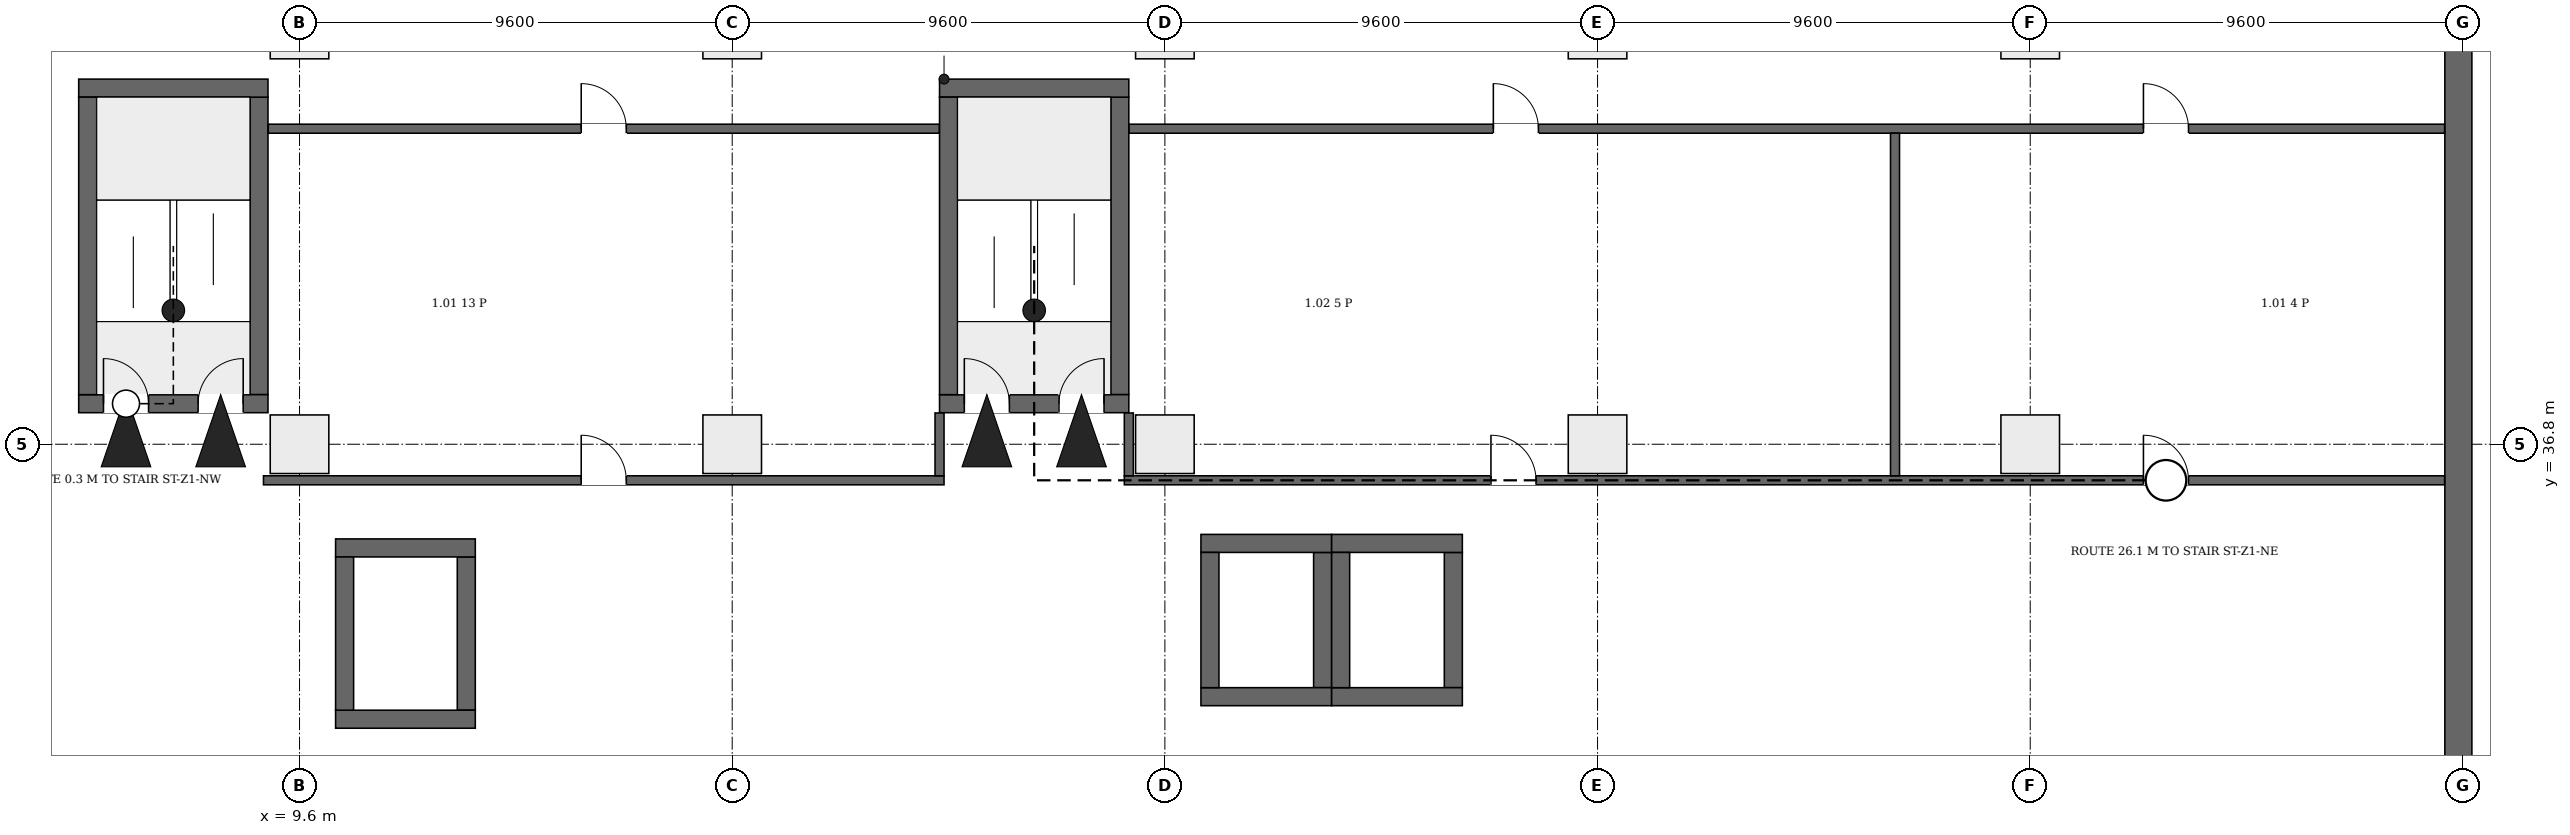
"""IFC4 building model, lengths in metres.
Left out: names, types, materials, properties, quantities, classifications, styles, units other than length and angle.
Written with IfcOpenShell. Run it as: python <this file> out.ifc"""

import sys

from ifc_helpers import new_model, si_unit, direction, frame, frame_2d, origin, origin_2d, place, context, subcontext, project, spatial, rectangle, extrude, element, fill, save


model = new_model("IFC4")
c1 = context("Model", 3, precision=1e-05, world=origin(), true_north=direction((0.0, 1.0)))
c2 = subcontext(c1, "Body", "Model", "MODEL_VIEW")
j1 = project(units=[si_unit("LENGTHUNIT", "METRE"), si_unit("PLANEANGLEUNIT", "RADIAN")], contexts=[c1])
p1 = place(None, origin())
s1 = spatial("IfcSite", under=j1, at=p1, CompositionType="ELEMENT")
p2 = place(p1, origin())
s2 = spatial("IfcBuilding", under=s1, at=p2, CompositionType="ELEMENT")
p3 = place(p2, frame((0.0, 0.0, -5.5)))
s3 = spatial("IfcBuildingStorey", under=s2, at=p3, CompositionType="ELEMENT", Elevation=-5.5)
p4 = place(p3, frame((57.5, -0.2, 0.0), z_axis=(0.0, 0.0, 1.0), x_axis=(0.0, 1.0, 0.0)))
e1 = element("IfcWall", 1, at=p4, inside=s3, PredefinedType="SOLIDWALL", context=c2, shape_type="SweptSolid", body=[
    extrude(rectangle(XDim=46.88, YDim=0.6, at=frame_2d((23.44, 0.0))), origin(), (0.0, 0.0, 1.0), 5.5),
])
p5 = place(p3, frame((4.7, 37.7, 0.0), z_axis=(0.0, 0.0, 1.0), x_axis=(1.0, 0.0, 0.0)))
e2 = element("IfcWall", 2, at=p5, inside=s3, PredefinedType="SHEAR", context=c2, shape_type="SweptSolid", body=[
    extrude(rectangle(XDim=4.2, YDim=0.4, at=frame_2d((2.1, 0.0))), origin(), (0.0, 0.0, 1.0), 5.5),
])
p6 = place(p5, frame((0.55, 0.0, 0.0)))
e3 = element("IfcOpeningElement", 3, at=p6, cuts=e2, PredefinedType="OPENING", context=c2, shape_type="SweptSolid", body=[
    extrude(rectangle(XDim=1.0, YDim=2.1, at=frame_2d((0.5, 1.05))), frame((0.0, 0.21, 0.0), z_axis=(0.0, -1.0, 0.0), x_axis=(1.0, 0.0, 0.0)), (0.0, 0.0, 1.0), 0.42),
])
p7 = place(p5, frame((2.65, 0.0, 0.0)))
e4 = element("IfcOpeningElement", 4, at=p7, cuts=e2, PredefinedType="OPENING", context=c2, shape_type="SweptSolid", body=[
    extrude(rectangle(XDim=1.0, YDim=2.1, at=frame_2d((0.5, 1.05))), frame((0.0, 0.21, 0.0), z_axis=(0.0, -1.0, 0.0), x_axis=(1.0, 0.0, 0.0)), (0.0, 0.0, 1.0), 0.42),
])
p8 = place(p3, frame((4.7, 44.7, 0.0), z_axis=(0.0, 0.0, 1.0), x_axis=(1.0, 0.0, 0.0)))
e5 = element("IfcWall", 5, at=p8, inside=s3, PredefinedType="SHEAR", context=c2, shape_type="SweptSolid", body=[
    extrude(rectangle(XDim=4.2, YDim=0.4, at=frame_2d((2.1, 0.0))), origin(), (0.0, 0.0, 1.0), 5.5),
])
for number, where, z_axis, x_axis in (
    (6, (4.9, 37.9, 0.0), (0.0, 0.0, 1.0), (0.0, 1.0, 0.0)),
    (7, (8.7, 37.9, 0.0), (0.0, 0.0, 1.0), (0.0, 1.0, 0.0)),
):
    element("IfcWall", number, at=place(p3, frame(where, z_axis=z_axis, x_axis=x_axis)), inside=s3, PredefinedType="SHEAR", context=c2, shape_type="SweptSolid", body=[
        extrude(rectangle(XDim=6.6, YDim=0.4, at=frame_2d((3.3, 0.0))), origin(), (0.0, 0.0, 1.0), 5.5),
    ])
p9 = place(p3, frame((23.8, 37.7, 0.0), z_axis=(0.0, 0.0, 1.0), x_axis=(1.0, 0.0, 0.0)))
e8 = element("IfcWall", 8, at=p9, inside=s3, PredefinedType="SHEAR", context=c2, shape_type="SweptSolid", body=[
    extrude(rectangle(XDim=4.2, YDim=0.4, at=frame_2d((2.1, 0.0))), origin(), (0.0, 0.0, 1.0), 5.5),
])
p10 = place(p9, frame((0.55, 0.0, 0.0)))
e9 = element("IfcOpeningElement", 9, at=p10, cuts=e8, PredefinedType="OPENING", context=c2, shape_type="SweptSolid", body=[
    extrude(rectangle(XDim=1.0, YDim=2.1, at=frame_2d((0.5, 1.05))), frame((0.0, 0.21, 0.0), z_axis=(0.0, -1.0, 0.0), x_axis=(1.0, 0.0, 0.0)), (0.0, 0.0, 1.0), 0.42),
])
p11 = place(p9, frame((2.65, 0.0, 0.0)))
e10 = element("IfcOpeningElement", 10, at=p11, cuts=e8, PredefinedType="OPENING", context=c2, shape_type="SweptSolid", body=[
    extrude(rectangle(XDim=1.0, YDim=2.1, at=frame_2d((0.5, 1.05))), frame((0.0, 0.21, 0.0), z_axis=(0.0, -1.0, 0.0), x_axis=(1.0, 0.0, 0.0)), (0.0, 0.0, 1.0), 0.42),
])
p12 = place(p3, frame((23.8, 44.7, 0.0), z_axis=(0.0, 0.0, 1.0), x_axis=(1.0, 0.0, 0.0)))
e11 = element("IfcWall", 11, at=p12, inside=s3, PredefinedType="SHEAR", context=c2, shape_type="SweptSolid", body=[
    extrude(rectangle(XDim=4.2, YDim=0.4, at=frame_2d((2.1, 0.0))), origin(), (0.0, 0.0, 1.0), 5.5),
])
for number, where, z_axis, x_axis in (
    (12, (24.0, 37.9, 0.0), (0.0, 0.0, 1.0), (0.0, 1.0, 0.0)),
    (13, (27.8, 37.9, 0.0), (0.0, 0.0, 1.0), (0.0, 1.0, 0.0)),
):
    element("IfcWall", number, at=place(p3, frame(where, z_axis=z_axis, x_axis=x_axis)), inside=s3, PredefinedType="SHEAR", context=c2, shape_type="SweptSolid", body=[
        extrude(rectangle(XDim=6.6, YDim=0.4, at=frame_2d((3.3, 0.0))), origin(), (0.0, 0.0, 1.0), 5.5),
    ])
for number, where, z_axis, x_axis in (
    (14, (10.4, 30.7, 0.0), (0.0, 0.0, 1.0), (1.0, 0.0, 0.0)),
    (15, (10.4, 34.5, 0.0), (0.0, 0.0, 1.0), (1.0, 0.0, 0.0)),
):
    element("IfcWall", number, at=place(p3, frame(where, z_axis=z_axis, x_axis=x_axis)), inside=s3, PredefinedType="SHEAR", context=c2, shape_type="SweptSolid", body=[
        extrude(rectangle(XDim=3.1, YDim=0.4, at=frame_2d((1.55, 0.0))), origin(), (0.0, 0.0, 1.0), 5.5),
    ])
for number, where, z_axis, x_axis in (
    (16, (10.6, 30.9, 0.0), (0.0, 0.0, 1.0), (0.0, 1.0, 0.0)),
    (17, (13.3, 30.9, 0.0), (0.0, 0.0, 1.0), (0.0, 1.0, 0.0)),
):
    element("IfcWall", number, at=place(p3, frame(where, z_axis=z_axis, x_axis=x_axis)), inside=s3, PredefinedType="SHEAR", context=c2, shape_type="SweptSolid", body=[
        extrude(rectangle(XDim=3.4, YDim=0.4, at=frame_2d((1.7, 0.0))), origin(), (0.0, 0.0, 1.0), 5.5),
    ])
for number, where, z_axis, x_axis in (
    (18, (29.6, 31.2, 0.0), (0.0, 0.0, 1.0), (1.0, 0.0, 0.0)),
    (19, (29.6, 34.6, 0.0), (0.0, 0.0, 1.0), (1.0, 0.0, 0.0)),
):
    element("IfcWall", number, at=place(p3, frame(where, z_axis=z_axis, x_axis=x_axis)), inside=s3, PredefinedType="SHEAR", context=c2, shape_type="SweptSolid", body=[
        extrude(rectangle(XDim=2.9, YDim=0.4, at=frame_2d((1.45, 0.0))), origin(), (0.0, 0.0, 1.0), 5.5),
    ])
for number, where, z_axis, x_axis in (
    (20, (29.8, 31.4, 0.0), (0.0, 0.0, 1.0), (0.0, 1.0, 0.0)),
    (21, (32.3, 31.4, 0.0), (0.0, 0.0, 1.0), (0.0, 1.0, 0.0)),
):
    element("IfcWall", number, at=place(p3, frame(where, z_axis=z_axis, x_axis=x_axis)), inside=s3, PredefinedType="SHEAR", context=c2, shape_type="SweptSolid", body=[
        extrude(rectangle(XDim=3.0, YDim=0.4, at=frame_2d((1.5, 0.0))), origin(), (0.0, 0.0, 1.0), 5.5),
    ])
for number, where, z_axis, x_axis in (
    (22, (32.5, 31.2, 0.0), (0.0, 0.0, 1.0), (1.0, 0.0, 0.0)),
    (23, (32.5, 34.6, 0.0), (0.0, 0.0, 1.0), (1.0, 0.0, 0.0)),
):
    element("IfcWall", number, at=place(p3, frame(where, z_axis=z_axis, x_axis=x_axis)), inside=s3, PredefinedType="SHEAR", context=c2, shape_type="SweptSolid", body=[
        extrude(rectangle(XDim=2.9, YDim=0.4, at=frame_2d((1.45, 0.0))), origin(), (0.0, 0.0, 1.0), 5.5),
    ])
for number, where, z_axis, x_axis in (
    (24, (32.7, 31.4, 0.0), (0.0, 0.0, 1.0), (0.0, 1.0, 0.0)),
    (25, (35.2, 31.4, 0.0), (0.0, 0.0, 1.0), (0.0, 1.0, 0.0)),
):
    element("IfcWall", number, at=place(p3, frame(where, z_axis=z_axis, x_axis=x_axis)), inside=s3, PredefinedType="SHEAR", context=c2, shape_type="SweptSolid", body=[
        extrude(rectangle(XDim=3.0, YDim=0.4, at=frame_2d((1.5, 0.0))), origin(), (0.0, 0.0, 1.0), 5.5),
    ])
for number, where, z_axis, x_axis in (
    (26, (9.6, 36.8, 0.0), (0.0, 0.0, 1.0), (1.0, 0.0, 0.0)),
    (27, (19.2, 36.8, 0.0), (0.0, 0.0, 1.0), (1.0, 0.0, 0.0)),
    (28, (28.8, 36.8, 0.0), (0.0, 0.0, 1.0), (1.0, 0.0, 0.0)),
    (29, (38.4, 36.8, 0.0), (0.0, 0.0, 1.0), (1.0, 0.0, 0.0)),
    (30, (48.0, 36.8, 0.0), (0.0, 0.0, 1.0), (1.0, 0.0, 0.0)),
    (31, (9.6, 46.0, 0.0), (0.0, 0.0, 1.0), (1.0, 0.0, 0.0)),
    (32, (19.2, 46.0, 0.0), (0.0, 0.0, 1.0), (1.0, 0.0, 0.0)),
    (33, (28.8, 46.0, 0.0), (0.0, 0.0, 1.0), (1.0, 0.0, 0.0)),
    (34, (38.4, 46.0, 0.0), (0.0, 0.0, 1.0), (1.0, 0.0, 0.0)),
    (35, (48.0, 46.0, 0.0), (0.0, 0.0, 1.0), (1.0, 0.0, 0.0)),
):
    element("IfcColumn", number, at=place(p3, frame(where, z_axis=z_axis, x_axis=x_axis)), inside=s3, PredefinedType="COLUMN", context=c2, shape_type="SweptSolid", body=[
        extrude(rectangle(XDim=1.3, YDim=1.3, at=origin_2d()), origin(), (0.0, 0.0, 1.0), 5.5),
    ])
p13 = place(p3, frame((8.8, 36.0, 0.0), z_axis=(0.0, 0.0, 1.0), x_axis=(1.0, 0.0, 0.0)))
e36 = element("IfcWall", 36, at=p13, inside=s3, PredefinedType="PARTITIONING", context=c2, shape_type="SweptSolid", body=[
    extrude(rectangle(XDim=15.1, YDim=0.2, at=frame_2d((7.55, 0.0))), origin(), (0.0, 0.0, 1.0), 5.15),
])
p14 = place(p13, frame((7.05, 0.0, 0.0)))
e37 = element("IfcOpeningElement", 37, at=p14, cuts=e36, PredefinedType="OPENING", context=c2, shape_type="SweptSolid", body=[
    extrude(rectangle(XDim=1.0, YDim=2.1, at=frame_2d((0.5, 1.05))), frame((0.0, 0.11, 0.0), z_axis=(0.0, -1.0, 0.0), x_axis=(1.0, 0.0, 0.0)), (0.0, 0.0, 1.0), 0.22),
])
p15 = place(p3, frame((8.906, 43.8, 0.0), z_axis=(0.0, 0.0, 1.0), x_axis=(1.0, 0.0, 0.0)))
e38 = element("IfcWall", 38, at=p15, inside=s3, PredefinedType="PARTITIONING", context=c2, shape_type="SweptSolid", body=[
    extrude(rectangle(XDim=14.888, YDim=0.2, at=frame_2d((7.444, 0.0))), origin(), (0.0, 0.0, 1.0), 5.15),
])
p16 = place(p15, frame((6.944, 0.0, 0.0)))
e39 = element("IfcOpeningElement", 39, at=p16, cuts=e38, PredefinedType="OPENING", context=c2, shape_type="SweptSolid", body=[
    extrude(rectangle(XDim=1.0, YDim=2.1, at=frame_2d((0.5, 1.05))), frame((0.0, 0.11, 0.0), z_axis=(0.0, -1.0, 0.0), x_axis=(1.0, 0.0, 0.0)), (0.0, 0.0, 1.0), 0.22),
])
p17 = place(p3, frame((23.8, 36.1, 0.0), z_axis=(0.0, 0.0, 1.0), x_axis=(0.0, 1.0, 0.0)))
e40 = element("IfcWall", 40, at=p17, inside=s3, PredefinedType="PARTITIONING", context=c2, shape_type="SweptSolid", body=[
    extrude(rectangle(XDim=1.394, YDim=0.2, at=frame_2d((0.697, 0.0))), origin(), (0.0, 0.0, 1.0), 5.15),
])
p18 = place(p3, frame((27.9, 36.0, 0.0), z_axis=(0.0, 0.0, 1.0), x_axis=(1.0, 0.0, 0.0)))
e41 = element("IfcWall", 41, at=p18, inside=s3, PredefinedType="PARTITIONING", context=c2, shape_type="SweptSolid", body=[
    extrude(rectangle(XDim=29.294, YDim=0.2, at=frame_2d((14.647, 0.0))), origin(), (0.0, 0.0, 1.0), 5.15),
])
p19 = place(p18, frame((8.135, 0.0, 0.0)))
e42 = element("IfcOpeningElement", 42, at=p19, cuts=e41, PredefinedType="OPENING", context=c2, shape_type="SweptSolid", body=[
    extrude(rectangle(XDim=1.0, YDim=2.1, at=frame_2d((0.5, 1.05))), frame((0.0, 0.11, 0.0), z_axis=(0.0, -1.0, 0.0), x_axis=(1.0, 0.0, 0.0)), (0.0, 0.0, 1.0), 0.22),
])
p20 = place(p18, frame((22.612, 0.0, 0.0)))
e43 = element("IfcOpeningElement", 43, at=p20, cuts=e41, PredefinedType="OPENING", context=c2, shape_type="SweptSolid", body=[
    extrude(rectangle(XDim=1.0, YDim=2.1, at=frame_2d((0.5, 1.05))), frame((0.0, 0.11, 0.0), z_axis=(0.0, -1.0, 0.0), x_axis=(1.0, 0.0, 0.0)), (0.0, 0.0, 1.0), 0.22),
])
p21 = place(p3, frame((28.0, 36.1, 0.0), z_axis=(0.0, 0.0, 1.0), x_axis=(0.0, 1.0, 0.0)))
e44 = element("IfcWall", 44, at=p21, inside=s3, PredefinedType="PARTITIONING", context=c2, shape_type="SweptSolid", body=[
    extrude(rectangle(XDim=1.394, YDim=0.2, at=frame_2d((0.697, 0.0))), origin(), (0.0, 0.0, 1.0), 5.15),
])
p22 = place(p3, frame((28.006, 43.8, 0.0), z_axis=(0.0, 0.0, 1.0), x_axis=(1.0, 0.0, 0.0)))
e45 = element("IfcWall", 45, at=p22, inside=s3, PredefinedType="PARTITIONING", context=c2, shape_type="SweptSolid", body=[
    extrude(rectangle(XDim=29.188, YDim=0.2, at=frame_2d((14.594, 0.0))), origin(), (0.0, 0.0, 1.0), 5.15),
])
p23 = place(p22, frame((8.082, 0.0, 0.0)))
e46 = element("IfcOpeningElement", 46, at=p23, cuts=e45, PredefinedType="OPENING", context=c2, shape_type="SweptSolid", body=[
    extrude(rectangle(XDim=1.0, YDim=2.1, at=frame_2d((0.5, 1.05))), frame((0.0, 0.11, 0.0), z_axis=(0.0, -1.0, 0.0), x_axis=(1.0, 0.0, 0.0)), (0.0, 0.0, 1.0), 0.22),
])
p24 = place(p22, frame((22.506, 0.0, 0.0)))
e47 = element("IfcOpeningElement", 47, at=p24, cuts=e45, PredefinedType="OPENING", context=c2, shape_type="SweptSolid", body=[
    extrude(rectangle(XDim=1.0, YDim=2.1, at=frame_2d((0.5, 1.05))), frame((0.0, 0.11, 0.0), z_axis=(0.0, -1.0, 0.0), x_axis=(1.0, 0.0, 0.0)), (0.0, 0.0, 1.0), 0.22),
])
p25 = place(p3, frame((45.0, 36.1, 0.0), z_axis=(0.0, 0.0, 1.0), x_axis=(0.0, 1.0, 0.0)))
e48 = element("IfcWall", 48, at=p25, inside=s3, PredefinedType="PARTITIONING", context=c2, shape_type="SweptSolid", body=[
    extrude(rectangle(XDim=7.6, YDim=0.2, at=frame_2d((3.8, 0.0))), origin(), (0.0, 0.0, 1.0), 5.15),
])
p26 = place(p6, origin())
e49 = element("IfcDoor", 49, at=p26, inside=s3, OperationType="SINGLE_SWING_RIGHT", PredefinedType="DOOR", context=c2, shape_type="SweptSolid", body=[
    extrude(rectangle(XDim=1.0, YDim=2.1, at=frame_2d((0.5, 1.05))), frame((0.0, 0.025, 0.0), z_axis=(0.0, -1.0, 0.0), x_axis=(1.0, 0.0, 0.0)), (0.0, 0.0, 1.0), 0.05),
])
fill(e3, e49)
p27 = place(p7, origin())
e50 = element("IfcDoor", 50, at=p27, inside=s3, OperationType="SINGLE_SWING_LEFT", PredefinedType="DOOR", context=c2, shape_type="SweptSolid", body=[
    extrude(rectangle(XDim=1.0, YDim=2.1, at=frame_2d((0.5, 1.05))), frame((0.0, 0.025, 0.0), z_axis=(0.0, -1.0, 0.0), x_axis=(1.0, 0.0, 0.0)), (0.0, 0.0, 1.0), 0.05),
])
fill(e4, e50)
p28 = place(p10, origin())
e51 = element("IfcDoor", 51, at=p28, inside=s3, OperationType="SINGLE_SWING_RIGHT", PredefinedType="DOOR", context=c2, shape_type="SweptSolid", body=[
    extrude(rectangle(XDim=1.0, YDim=2.1, at=frame_2d((0.5, 1.05))), frame((0.0, 0.025, 0.0), z_axis=(0.0, -1.0, 0.0), x_axis=(1.0, 0.0, 0.0)), (0.0, 0.0, 1.0), 0.05),
])
fill(e9, e51)
p29 = place(p11, origin())
e52 = element("IfcDoor", 52, at=p29, inside=s3, OperationType="SINGLE_SWING_LEFT", PredefinedType="DOOR", context=c2, shape_type="SweptSolid", body=[
    extrude(rectangle(XDim=1.0, YDim=2.1, at=frame_2d((0.5, 1.05))), frame((0.0, 0.025, 0.0), z_axis=(0.0, -1.0, 0.0), x_axis=(1.0, 0.0, 0.0)), (0.0, 0.0, 1.0), 0.05),
])
fill(e10, e52)
p30 = place(p16, origin())
e53 = element("IfcDoor", 53, at=p30, inside=s3, OperationType="SINGLE_SWING_RIGHT", PredefinedType="DOOR", context=c2, shape_type="SweptSolid", body=[
    extrude(rectangle(XDim=1.0, YDim=2.1, at=frame_2d((0.5, 1.05))), frame((0.0, 0.025, 0.0), z_axis=(0.0, -1.0, 0.0), x_axis=(1.0, 0.0, 0.0)), (0.0, 0.0, 1.0), 0.05),
])
fill(e39, e53)
p31 = place(p14, origin())
e54 = element("IfcDoor", 54, at=p31, inside=s3, OperationType="SINGLE_SWING_RIGHT", PredefinedType="DOOR", context=c2, shape_type="SweptSolid", body=[
    extrude(rectangle(XDim=1.0, YDim=2.1, at=frame_2d((0.5, 1.05))), frame((0.0, 0.025, 0.0), z_axis=(0.0, -1.0, 0.0), x_axis=(1.0, 0.0, 0.0)), (0.0, 0.0, 1.0), 0.05),
])
fill(e37, e54)
p32 = place(p23, origin())
e55 = element("IfcDoor", 55, at=p32, inside=s3, OperationType="SINGLE_SWING_LEFT", PredefinedType="DOOR", context=c2, shape_type="SweptSolid", body=[
    extrude(rectangle(XDim=1.0, YDim=2.1, at=frame_2d((0.5, 1.05))), frame((0.0, 0.025, 0.0), z_axis=(0.0, -1.0, 0.0), x_axis=(1.0, 0.0, 0.0)), (0.0, 0.0, 1.0), 0.05),
])
fill(e46, e55)
p33 = place(p19, origin())
e56 = element("IfcDoor", 56, at=p33, inside=s3, OperationType="SINGLE_SWING_RIGHT", PredefinedType="DOOR", context=c2, shape_type="SweptSolid", body=[
    extrude(rectangle(XDim=1.0, YDim=2.1, at=frame_2d((0.5, 1.05))), frame((0.0, 0.025, 0.0), z_axis=(0.0, -1.0, 0.0), x_axis=(1.0, 0.0, 0.0)), (0.0, 0.0, 1.0), 0.05),
])
fill(e42, e56)
p34 = place(p24, origin())
e57 = element("IfcDoor", 57, at=p34, inside=s3, OperationType="SINGLE_SWING_RIGHT", PredefinedType="DOOR", context=c2, shape_type="SweptSolid", body=[
    extrude(rectangle(XDim=1.0, YDim=2.1, at=frame_2d((0.5, 1.05))), frame((0.0, 0.025, 0.0), z_axis=(0.0, -1.0, 0.0), x_axis=(1.0, 0.0, 0.0)), (0.0, 0.0, 1.0), 0.05),
])
fill(e47, e57)
p35 = place(p20, origin())
e58 = element("IfcDoor", 58, at=p35, inside=s3, OperationType="SINGLE_SWING_LEFT", PredefinedType="DOOR", context=c2, shape_type="SweptSolid", body=[
    extrude(rectangle(XDim=1.0, YDim=2.1, at=frame_2d((0.5, 1.05))), frame((0.0, 0.025, 0.0), z_axis=(0.0, -1.0, 0.0), x_axis=(1.0, 0.0, 0.0)), (0.0, 0.0, 1.0), 0.05),
])
fill(e43, e58)
save(model, sys.argv[1])
